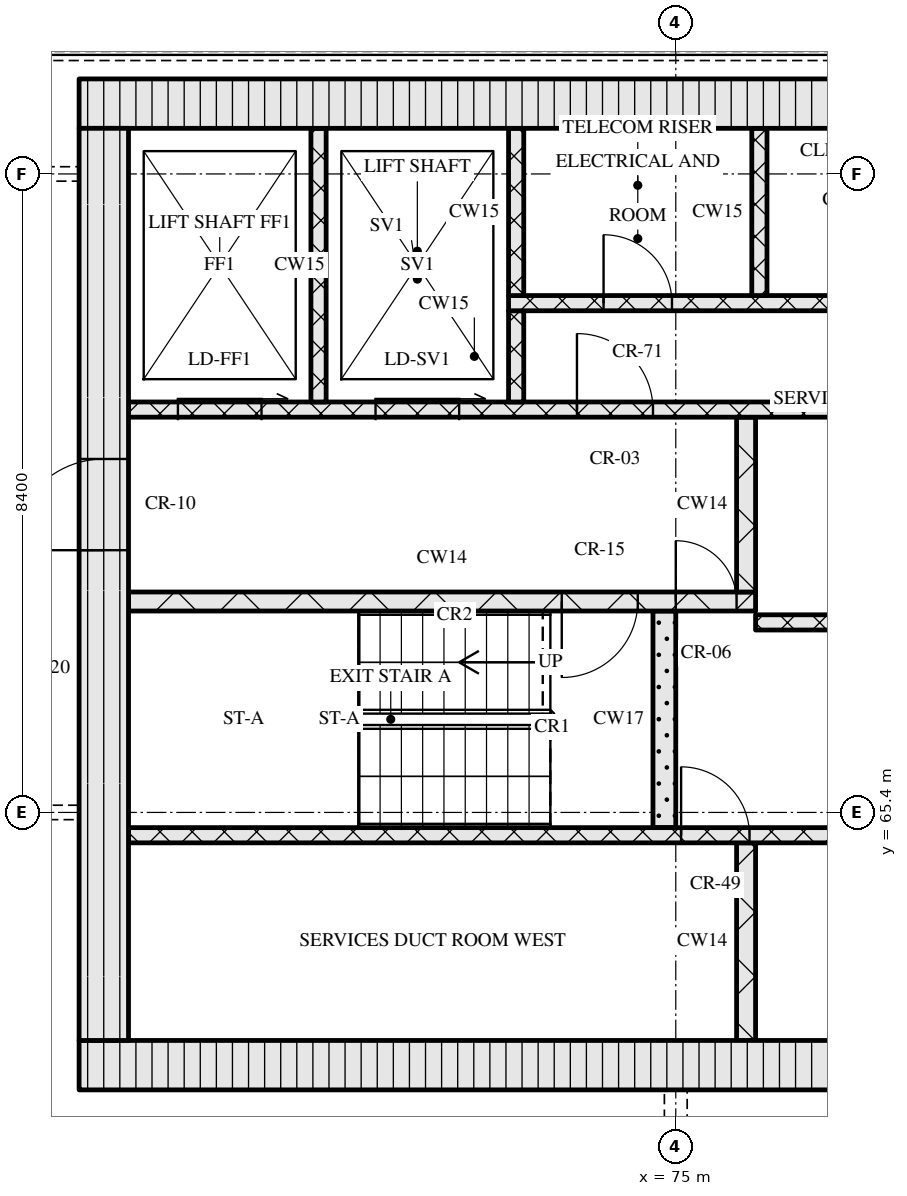
"""IFC4 building model, lengths in metres.
Left out: names, types, materials, properties, quantities, classifications, styles, units other than length and angle.
Written with IfcOpenShell. Run it as: python <this file> out.ifc"""

import sys

from ifc_helpers import new_model, si_unit, direction, frame, frame_2d, origin, place, context, subcontext, project, spatial, rectangle, extrude, element, fill, save


model = new_model("IFC4")
c1 = context("Model", 3, precision=1e-05, world=origin(), true_north=direction((0.0, 1.0)))
c2 = subcontext(c1, "Body", "Model", "MODEL_VIEW")
j1 = project(units=[si_unit("LENGTHUNIT", "METRE"), si_unit("PLANEANGLEUNIT", "RADIAN")], contexts=[c1])
p1 = place(None, origin())
s1 = spatial("IfcSite", under=j1, at=p1, CompositionType="ELEMENT")
p2 = place(p1, origin())
s2 = spatial("IfcBuilding", under=s1, at=p2, CompositionType="ELEMENT")
p3 = place(p2, frame((0.0, 0.0, 212.7)))
s3 = spatial("IfcBuildingStorey", under=s2, at=p3, CompositionType="ELEMENT", Elevation=212.7)
p4 = place(p3, frame((67.15, 62.075, 0.0), z_axis=(0.0, 0.0, 1.0), x_axis=(1.0, 0.0, 0.0)))
e1 = element("IfcWall", 1, at=p4, inside=s3, PredefinedType="SOLIDWALL", context=c2, shape_type="SweptSolid", body=[
    extrude(rectangle(XDim=40.9, YDim=0.65, at=frame_2d((20.45, 0.0))), origin(), (0.0, 0.0, 1.0), 3.32),
])
p5 = place(p4, frame((20.8, 0.0, 0.0)))
e2 = element("IfcOpeningElement", 2, at=p5, cuts=e1, PredefinedType="OPENING", context=c2, shape_type="SweptSolid", body=[
    extrude(rectangle(XDim=1.8, YDim=2.1, at=frame_2d((0.9, 1.05))), frame((0.0, 0.335, 0.0), z_axis=(0.0, -1.0, 0.0), x_axis=(1.0, 0.0, 0.0)), (0.0, 0.0, 1.0), 0.67),
])
p6 = place(p3, frame((67.15, 74.725, 0.0), z_axis=(0.0, 0.0, 1.0), x_axis=(1.0, 0.0, 0.0)))
e3 = element("IfcWall", 3, at=p6, inside=s3, PredefinedType="SOLIDWALL", context=c2, shape_type="SweptSolid", body=[
    extrude(rectangle(XDim=40.9, YDim=0.65, at=frame_2d((20.45, 0.0))), origin(), (0.0, 0.0, 1.0), 3.32),
])
p7 = place(p3, frame((67.475, 62.4, 0.0), z_axis=(0.0, 0.0, 1.0), x_axis=(0.0, 1.0, 0.0)))
e4 = element("IfcWall", 4, at=p7, inside=s3, PredefinedType="SOLIDWALL", context=c2, shape_type="SweptSolid", body=[
    extrude(rectangle(XDim=12.0, YDim=0.65, at=frame_2d((6.0, 0.0))), origin(), (0.0, 0.0, 1.0), 3.32),
])
p8 = place(p7, frame((6.45, 0.0, 0.0)))
e5 = element("IfcOpeningElement", 5, at=p8, cuts=e4, PredefinedType="OPENING", context=c2, shape_type="SweptSolid", body=[
    extrude(rectangle(XDim=1.2, YDim=2.1, at=frame_2d((0.6, 1.05))), frame((0.0, 0.335, 0.0), z_axis=(0.0, -1.0, 0.0), x_axis=(1.0, 0.0, 0.0)), (0.0, 0.0, 1.0), 0.67),
])
p9 = place(p3, frame((75.925, 62.4, 0.0), z_axis=(0.0, 0.0, 1.0), x_axis=(0.0, 1.0, 0.0)))
e6 = element("IfcWall", 6, at=p9, inside=s3, PredefinedType="SOLIDWALL", context=c2, shape_type="SweptSolid", body=[
    extrude(rectangle(XDim=2.6, YDim=0.25, at=frame_2d((1.3, 0.0))), origin(), (0.0, 0.0, 1.0), 3.32),
])
p10 = place(p3, frame((67.8, 65.1, 0.0), z_axis=(0.0, 0.0, 1.0), x_axis=(1.0, 0.0, 0.0)))
e7 = element("IfcWall", 7, at=p10, inside=s3, PredefinedType="SOLIDWALL", context=c2, shape_type="SweptSolid", body=[
    extrude(rectangle(XDim=18.5, YDim=0.2, at=frame_2d((9.25, 0.0))), origin(), (0.0, 0.0, 1.0), 3.32),
])
p11 = place(p10, frame((7.27, 0.0, 0.0)))
e8 = element("IfcOpeningElement", 8, at=p11, cuts=e7, PredefinedType="OPENING", context=c2, shape_type="SweptSolid", body=[
    extrude(rectangle(XDim=0.9, YDim=2.1, at=frame_2d((0.45, 1.05))), frame((0.0, 0.11, 0.0), z_axis=(0.0, -1.0, 0.0), x_axis=(1.0, 0.0, 0.0)), (0.0, 0.0, 1.0), 0.22),
])
p12 = place(p10, frame((11.45, 0.0, 0.0)))
e9 = element("IfcOpeningElement", 9, at=p12, cuts=e7, PredefinedType="OPENING", context=c2, shape_type="SweptSolid", body=[
    extrude(rectangle(XDim=0.9, YDim=2.1, at=frame_2d((0.45, 1.05))), frame((0.0, 0.11, 0.0), z_axis=(0.0, -1.0, 0.0), x_axis=(1.0, 0.0, 0.0)), (0.0, 0.0, 1.0), 0.22),
])
p13 = place(p10, frame((16.7, 0.0, 0.0)))
e10 = element("IfcOpeningElement", 10, at=p13, cuts=e7, PredefinedType="OPENING", context=c2, shape_type="SweptSolid", body=[
    extrude(rectangle(XDim=0.9, YDim=2.1, at=frame_2d((0.45, 1.05))), frame((0.0, 0.11, 0.0), z_axis=(0.0, -1.0, 0.0), x_axis=(1.0, 0.0, 0.0)), (0.0, 0.0, 1.0), 0.22),
])
p14 = place(p3, frame((74.85, 65.2, 0.0), z_axis=(0.0, 0.0, 1.0), x_axis=(0.0, 1.0, 0.0)))
e11 = element("IfcWall", 11, at=p14, inside=s3, PredefinedType="SOLIDWALL", context=c2, shape_type="SweptSolid", body=[
    extrude(rectangle(XDim=2.85, YDim=0.3, at=frame_2d((1.425, 0.0))), origin(), (0.0, 0.0, 1.0), 3.32),
])
p15 = place(p3, frame((76.05, 67.9, 0.0), z_axis=(0.0, 0.0, 1.0), x_axis=(1.0, 0.0, 0.0)))
e12 = element("IfcWall", 12, at=p15, inside=s3, PredefinedType="SOLIDWALL", context=c2, shape_type="SweptSolid", body=[
    extrude(rectangle(XDim=23.1, YDim=0.2, at=frame_2d((11.55, 0.0))), origin(), (0.0, 0.0, 1.0), 3.32),
])
p16 = place(p15, frame((1.4, 0.0, 0.0)))
e13 = element("IfcOpeningElement", 13, at=p16, cuts=e12, PredefinedType="OPENING", context=c2, shape_type="SweptSolid", body=[
    extrude(rectangle(XDim=0.9, YDim=2.1, at=frame_2d((0.45, 1.05))), frame((0.0, 0.11, 0.0), z_axis=(0.0, -1.0, 0.0), x_axis=(1.0, 0.0, 0.0)), (0.0, 0.0, 1.0), 0.22),
])
p17 = place(p15, frame((5.11, 0.0, 0.0)))
e14 = element("IfcOpeningElement", 14, at=p17, cuts=e12, PredefinedType="OPENING", context=c2, shape_type="SweptSolid", body=[
    extrude(rectangle(XDim=0.9, YDim=2.1, at=frame_2d((0.45, 1.05))), frame((0.0, 0.11, 0.0), z_axis=(0.0, -1.0, 0.0), x_axis=(1.0, 0.0, 0.0)), (0.0, 0.0, 1.0), 0.22),
])
p18 = place(p15, frame((8.45, 0.0, 0.0)))
e15 = element("IfcOpeningElement", 15, at=p18, cuts=e12, PredefinedType="OPENING", context=c2, shape_type="SweptSolid", body=[
    extrude(rectangle(XDim=0.9, YDim=2.1, at=frame_2d((0.45, 1.05))), frame((0.0, 0.11, 0.0), z_axis=(0.0, -1.0, 0.0), x_axis=(1.0, 0.0, 0.0)), (0.0, 0.0, 1.0), 0.22),
])
p19 = place(p15, frame((10.91, 0.0, 0.0)))
e16 = element("IfcOpeningElement", 16, at=p19, cuts=e12, PredefinedType="OPENING", context=c2, shape_type="SweptSolid", body=[
    extrude(rectangle(XDim=0.9, YDim=2.1, at=frame_2d((0.45, 1.05))), frame((0.0, 0.11, 0.0), z_axis=(0.0, -1.0, 0.0), x_axis=(1.0, 0.0, 0.0)), (0.0, 0.0, 1.0), 0.22),
])
p20 = place(p15, frame((13.55, 0.0, 0.0)))
e17 = element("IfcOpeningElement", 17, at=p20, cuts=e12, PredefinedType="OPENING", context=c2, shape_type="SweptSolid", body=[
    extrude(rectangle(XDim=1.0, YDim=2.1, at=frame_2d((0.5, 1.05))), frame((0.0, 0.11, 0.0), z_axis=(0.0, -1.0, 0.0), x_axis=(1.0, 0.0, 0.0)), (0.0, 0.0, 1.0), 0.22),
])
p21 = place(p15, frame((16.2, 0.0, 0.0)))
e18 = element("IfcOpeningElement", 18, at=p21, cuts=e12, PredefinedType="OPENING", context=c2, shape_type="SweptSolid", body=[
    extrude(rectangle(XDim=1.1, YDim=2.1, at=frame_2d((0.55, 1.05))), frame((0.0, 0.11, 0.0), z_axis=(0.0, -1.0, 0.0), x_axis=(1.0, 0.0, 0.0)), (0.0, 0.0, 1.0), 0.22),
])
p22 = place(p15, frame((18.7, 0.0, 0.0)))
e19 = element("IfcOpeningElement", 19, at=p22, cuts=e12, PredefinedType="OPENING", context=c2, shape_type="SweptSolid", body=[
    extrude(rectangle(XDim=1.1, YDim=2.1, at=frame_2d((0.55, 1.05))), frame((0.0, 0.11, 0.0), z_axis=(0.0, -1.0, 0.0), x_axis=(1.0, 0.0, 0.0)), (0.0, 0.0, 1.0), 0.22),
])
p23 = place(p15, frame((21.2, 0.0, 0.0)))
e20 = element("IfcOpeningElement", 20, at=p23, cuts=e12, PredefinedType="OPENING", context=c2, shape_type="SweptSolid", body=[
    extrude(rectangle(XDim=1.1, YDim=2.1, at=frame_2d((0.55, 1.05))), frame((0.0, 0.11, 0.0), z_axis=(0.0, -1.0, 0.0), x_axis=(1.0, 0.0, 0.0)), (0.0, 0.0, 1.0), 0.22),
])
p24 = place(p3, frame((67.8, 68.175, 0.0), z_axis=(0.0, 0.0, 1.0), x_axis=(1.0, 0.0, 0.0)))
e21 = element("IfcWall", 21, at=p24, inside=s3, PredefinedType="SOLIDWALL", context=c2, shape_type="SweptSolid", body=[
    extrude(rectangle(XDim=8.25, YDim=0.25, at=frame_2d((4.125, 0.0))), origin(), (0.0, 0.0, 1.0), 3.32),
])
p25 = place(p24, frame((5.7, 0.0, 0.0)))
e22 = element("IfcOpeningElement", 22, at=p25, cuts=e21, PredefinedType="OPENING", context=c2, shape_type="SweptSolid", body=[
    extrude(rectangle(XDim=1.0, YDim=2.1, at=frame_2d((0.5, 1.05))), frame((0.0, 0.135, 0.0), z_axis=(0.0, -1.0, 0.0), x_axis=(1.0, 0.0, 0.0)), (0.0, 0.0, 1.0), 0.27),
])
p26 = place(p24, frame((7.2, 0.0, 0.0)))
e23 = element("IfcOpeningElement", 23, at=p26, cuts=e21, PredefinedType="OPENING", context=c2, shape_type="SweptSolid", body=[
    extrude(rectangle(XDim=0.8, YDim=2.1, at=frame_2d((0.4, 1.05))), frame((0.0, 0.135, 0.0), z_axis=(0.0, -1.0, 0.0), x_axis=(1.0, 0.0, 0.0)), (0.0, 0.0, 1.0), 0.27),
])
p27 = place(p3, frame((75.925, 68.3, 0.0), z_axis=(0.0, 0.0, 1.0), x_axis=(0.0, 1.0, 0.0)))
e24 = element("IfcWall", 24, at=p27, inside=s3, PredefinedType="SOLIDWALL", context=c2, shape_type="SweptSolid", body=[
    extrude(rectangle(XDim=2.3, YDim=0.25, at=frame_2d((1.15, 0.0))), origin(), (0.0, 0.0, 1.0), 3.32),
])
p28 = place(p3, frame((67.8, 70.7, 0.0), z_axis=(0.0, 0.0, 1.0), x_axis=(1.0, 0.0, 0.0)))
e25 = element("IfcWall", 25, at=p28, inside=s3, PredefinedType="SOLIDWALL", context=c2, shape_type="SweptSolid", body=[
    extrude(rectangle(XDim=39.6, YDim=0.2, at=frame_2d((19.8, 0.0))), origin(), (0.0, 0.0, 1.0), 3.32),
])
p29 = place(p28, frame((0.65, 0.0, 0.0)))
e26 = element("IfcOpeningElement", 26, at=p29, cuts=e25, PredefinedType="OPENING", context=c2, shape_type="SweptSolid", body=[
    extrude(rectangle(XDim=1.1, YDim=2.1, at=frame_2d((0.55, 1.05))), frame((0.0, 0.11, 0.0), z_axis=(0.0, -1.0, 0.0), x_axis=(1.0, 0.0, 0.0)), (0.0, 0.0, 1.0), 0.22),
])
p30 = place(p28, frame((3.25, 0.0, 0.0)))
e27 = element("IfcOpeningElement", 27, at=p30, cuts=e25, PredefinedType="OPENING", context=c2, shape_type="SweptSolid", body=[
    extrude(rectangle(XDim=1.1, YDim=2.1, at=frame_2d((0.55, 1.05))), frame((0.0, 0.11, 0.0), z_axis=(0.0, -1.0, 0.0), x_axis=(1.0, 0.0, 0.0)), (0.0, 0.0, 1.0), 0.22),
])
p31 = place(p28, frame((5.9, 0.0, 0.0)))
e28 = element("IfcOpeningElement", 28, at=p31, cuts=e25, PredefinedType="OPENING", context=c2, shape_type="SweptSolid", body=[
    extrude(rectangle(XDim=1.0, YDim=2.1, at=frame_2d((0.5, 1.05))), frame((0.0, 0.11, 0.0), z_axis=(0.0, -1.0, 0.0), x_axis=(1.0, 0.0, 0.0)), (0.0, 0.0, 1.0), 0.22),
])
p32 = place(p28, frame((21.7, 0.0, 0.0)))
e29 = element("IfcOpeningElement", 29, at=p32, cuts=e25, PredefinedType="OPENING", context=c2, shape_type="SweptSolid", body=[
    extrude(rectangle(XDim=1.0, YDim=2.1, at=frame_2d((0.5, 1.05))), frame((0.0, 0.11, 0.0), z_axis=(0.0, -1.0, 0.0), x_axis=(1.0, 0.0, 0.0)), (0.0, 0.0, 1.0), 0.22),
])
p33 = place(p28, frame((32.7, 0.0, 0.0)))
e30 = element("IfcOpeningElement", 30, at=p33, cuts=e25, PredefinedType="OPENING", context=c2, shape_type="SweptSolid", body=[
    extrude(rectangle(XDim=1.0, YDim=2.1, at=frame_2d((0.5, 1.05))), frame((0.0, 0.11, 0.0), z_axis=(0.0, -1.0, 0.0), x_axis=(1.0, 0.0, 0.0)), (0.0, 0.0, 1.0), 0.22),
])
p34 = place(p28, frame((35.25, 0.0, 0.0)))
e31 = element("IfcOpeningElement", 31, at=p34, cuts=e25, PredefinedType="OPENING", context=c2, shape_type="SweptSolid", body=[
    extrude(rectangle(XDim=1.1, YDim=2.1, at=frame_2d((0.55, 1.05))), frame((0.0, 0.11, 0.0), z_axis=(0.0, -1.0, 0.0), x_axis=(1.0, 0.0, 0.0)), (0.0, 0.0, 1.0), 0.22),
])
p35 = place(p28, frame((37.85, 0.0, 0.0)))
e32 = element("IfcOpeningElement", 32, at=p35, cuts=e25, PredefinedType="OPENING", context=c2, shape_type="SweptSolid", body=[
    extrude(rectangle(XDim=1.1, YDim=2.1, at=frame_2d((0.55, 1.05))), frame((0.0, 0.11, 0.0), z_axis=(0.0, -1.0, 0.0), x_axis=(1.0, 0.0, 0.0)), (0.0, 0.0, 1.0), 0.22),
])
p36 = place(p3, frame((70.3, 70.8, 0.0), z_axis=(0.0, 0.0, 1.0), x_axis=(0.0, 1.0, 0.0)))
e33 = element("IfcWall", 33, at=p36, inside=s3, PredefinedType="SOLIDWALL", context=c2, shape_type="SweptSolid", body=[
    extrude(rectangle(XDim=3.6, YDim=0.2, at=frame_2d((1.8, 0.0))), origin(), (0.0, 0.0, 1.0), 3.32),
])
p37 = place(p3, frame((72.9, 70.8, 0.0), z_axis=(0.0, 0.0, 1.0), x_axis=(0.0, 1.0, 0.0)))
e34 = element("IfcWall", 34, at=p37, inside=s3, PredefinedType="SOLIDWALL", context=c2, shape_type="SweptSolid", body=[
    extrude(rectangle(XDim=1.2, YDim=0.2, at=frame_2d((0.6, 0.0))), origin(), (0.0, 0.0, 1.0), 3.32),
])
p38 = place(p3, frame((72.8, 72.1, 0.0), z_axis=(0.0, 0.0, 1.0), x_axis=(1.0, 0.0, 0.0)))
e35 = element("IfcWall", 35, at=p38, inside=s3, PredefinedType="SOLIDWALL", context=c2, shape_type="SweptSolid", body=[
    extrude(rectangle(XDim=8.92, YDim=0.2, at=frame_2d((4.46, 0.0))), origin(), (0.0, 0.0, 1.0), 3.32),
])
p39 = place(p38, frame((1.25, 0.0, 0.0)))
e36 = element("IfcOpeningElement", 36, at=p39, cuts=e35, PredefinedType="OPENING", context=c2, shape_type="SweptSolid", body=[
    extrude(rectangle(XDim=0.9, YDim=2.1, at=frame_2d((0.45, 1.05))), frame((0.0, 0.11, 0.0), z_axis=(0.0, -1.0, 0.0), x_axis=(1.0, 0.0, 0.0)), (0.0, 0.0, 1.0), 0.22),
])
p40 = place(p38, frame((4.45, 0.0, 0.0)))
e37 = element("IfcOpeningElement", 37, at=p40, cuts=e35, PredefinedType="OPENING", context=c2, shape_type="SweptSolid", body=[
    extrude(rectangle(XDim=0.9, YDim=2.1, at=frame_2d((0.45, 1.05))), frame((0.0, 0.11, 0.0), z_axis=(0.0, -1.0, 0.0), x_axis=(1.0, 0.0, 0.0)), (0.0, 0.0, 1.0), 0.22),
])
p41 = place(p38, frame((7.21, 0.0, 0.0)))
e38 = element("IfcOpeningElement", 38, at=p41, cuts=e35, PredefinedType="OPENING", context=c2, shape_type="SweptSolid", body=[
    extrude(rectangle(XDim=0.9, YDim=2.1, at=frame_2d((0.45, 1.05))), frame((0.0, 0.11, 0.0), z_axis=(0.0, -1.0, 0.0), x_axis=(1.0, 0.0, 0.0)), (0.0, 0.0, 1.0), 0.22),
])
for number, where, z_axis, x_axis in (
    (39, (72.9, 72.2, 0.0), (0.0, 0.0, 1.0), (0.0, 1.0, 0.0)),
    (40, (76.1, 72.2, 0.0), (0.0, 0.0, 1.0), (0.0, 1.0, 0.0)),
):
    element("IfcWall", number, at=place(p3, frame(where, z_axis=z_axis, x_axis=x_axis)), inside=s3, PredefinedType="SOLIDWALL", context=c2, shape_type="SweptSolid", body=[
        extrude(rectangle(XDim=2.2, YDim=0.2, at=frame_2d((1.1, 0.0))), origin(), (0.0, 0.0, 1.0), 3.32),
    ])
p42 = place(p11, origin())
e41 = element("IfcDoor", 41, at=p42, inside=s3, OperationType="SINGLE_SWING_LEFT", PredefinedType="DOOR", context=c2, shape_type="SweptSolid", body=[
    extrude(rectangle(XDim=0.9, YDim=2.1, at=frame_2d((0.45, 1.05))), frame((0.0, 0.025, 0.0), z_axis=(0.0, -1.0, 0.0), x_axis=(1.0, 0.0, 0.0)), (0.0, 0.0, 1.0), 0.05),
])
fill(e8, e41)
p43 = place(p25, origin())
e42 = element("IfcDoor", 42, at=p43, inside=s3, OperationType="SINGLE_SWING_RIGHT", PredefinedType="DOOR", context=c2, shape_type="SweptSolid", body=[
    extrude(rectangle(XDim=1.0, YDim=2.1, at=frame_2d((0.5, 1.05))), frame((0.0, 0.025, 0.0), z_axis=(0.0, -1.0, 0.0), x_axis=(1.0, 0.0, 0.0)), (0.0, 0.0, 1.0), 0.05),
])
fill(e22, e42)
p44 = place(p26, origin())
e43 = element("IfcDoor", 43, at=p44, inside=s3, OperationType="SINGLE_SWING_LEFT", PredefinedType="DOOR", context=c2, shape_type="SweptSolid", body=[
    extrude(rectangle(XDim=0.8, YDim=2.1, at=frame_2d((0.4, 1.05))), frame((0.0, 0.025, 0.0), z_axis=(0.0, -1.0, 0.0), x_axis=(1.0, 0.0, 0.0)), (0.0, 0.0, 1.0), 0.05),
])
fill(e23, e43)
p45 = place(p8, origin())
e44 = element("IfcDoor", 44, at=p45, inside=s3, OperationType="SINGLE_SWING_LEFT", PredefinedType="DOOR", context=c2, shape_type="SweptSolid", body=[
    extrude(rectangle(XDim=1.2, YDim=2.1, at=frame_2d((0.6, 1.05))), frame((0.0, 0.025, 0.0), z_axis=(0.0, -1.0, 0.0), x_axis=(1.0, 0.0, 0.0)), (0.0, 0.0, 1.0), 0.05),
])
fill(e5, e44)
p46 = place(p29, origin())
e45 = element("IfcDoor", 45, at=p46, inside=s3, OperationType="SLIDING_TO_RIGHT", PredefinedType="DOOR", context=c2, shape_type="SweptSolid", body=[
    extrude(rectangle(XDim=1.1, YDim=2.1, at=frame_2d((0.55, 1.05))), frame((0.0, 0.025, 0.0), z_axis=(0.0, -1.0, 0.0), x_axis=(1.0, 0.0, 0.0)), (0.0, 0.0, 1.0), 0.05),
])
fill(e26, e45)
p47 = place(p30, origin())
e46 = element("IfcDoor", 46, at=p47, inside=s3, OperationType="SLIDING_TO_RIGHT", PredefinedType="DOOR", context=c2, shape_type="SweptSolid", body=[
    extrude(rectangle(XDim=1.1, YDim=2.1, at=frame_2d((0.55, 1.05))), frame((0.0, 0.025, 0.0), z_axis=(0.0, -1.0, 0.0), x_axis=(1.0, 0.0, 0.0)), (0.0, 0.0, 1.0), 0.05),
])
fill(e27, e46)
p48 = place(p31, origin())
e47 = element("IfcDoor", 47, at=p48, inside=s3, OperationType="SINGLE_SWING_LEFT", PredefinedType="DOOR", context=c2, shape_type="SweptSolid", body=[
    extrude(rectangle(XDim=1.0, YDim=2.1, at=frame_2d((0.5, 1.05))), frame((0.0, 0.025, 0.0), z_axis=(0.0, -1.0, 0.0), x_axis=(1.0, 0.0, 0.0)), (0.0, 0.0, 1.0), 0.05),
])
fill(e28, e47)
p49 = place(p39, origin())
e48 = element("IfcDoor", 48, at=p49, inside=s3, OperationType="SINGLE_SWING_LEFT", PredefinedType="DOOR", context=c2, shape_type="SweptSolid", body=[
    extrude(rectangle(XDim=0.9, YDim=2.1, at=frame_2d((0.45, 1.05))), frame((0.0, 0.025, 0.0), z_axis=(0.0, -1.0, 0.0), x_axis=(1.0, 0.0, 0.0)), (0.0, 0.0, 1.0), 0.05),
])
fill(e36, e48)
save(model, sys.argv[1])
